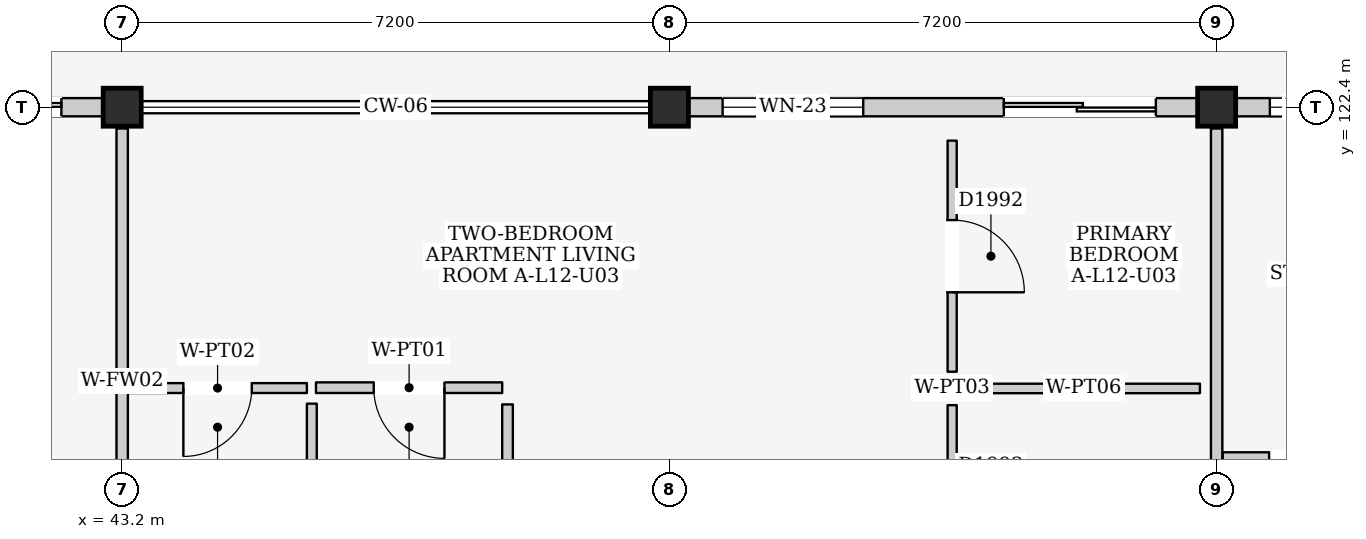
"""IFC4 building model, lengths in metres.
Left out: names, types, materials, properties, quantities, classifications, styles, units other than length and angle.
Written with IfcOpenShell. Run it as: python <this file> out.ifc"""

import sys

from ifc_helpers import new_model, si_unit, direction, frame, frame_2d, origin, origin_2d, place, context, subcontext, project, spatial, rectangle, extrude, element, fill, save


model = new_model("IFC4")
c1 = context("Model", 3, precision=1e-05, world=origin(), true_north=direction((0.0, 1.0)))
c2 = subcontext(c1, "Body", "Model", "MODEL_VIEW")
j1 = project(units=[si_unit("LENGTHUNIT", "METRE"), si_unit("PLANEANGLEUNIT", "RADIAN")], contexts=[c1])
p1 = place(None, origin())
s1 = spatial("IfcSite", under=j1, at=p1, CompositionType="ELEMENT")
p2 = place(p1, origin())
s2 = spatial("IfcBuilding", under=s1, at=p2, CompositionType="ELEMENT")
p3 = place(p2, frame((0.0, 0.0, 41.2)))
s3 = spatial("IfcBuildingStorey", under=s2, at=p3, CompositionType="ELEMENT", Elevation=41.2)
for number, where, z_axis, x_axis in (
    (1, (43.2, 122.4, 0.0), (0.0, 0.0, 1.0), (1.0, 0.0, 0.0)),
    (2, (50.4, 122.4, 0.0), (0.0, 0.0, 1.0), (1.0, 0.0, 0.0)),
    (3, (57.6, 122.4, 0.0), (0.0, 0.0, 1.0), (1.0, 0.0, 0.0)),
):
    element("IfcColumn", number, at=place(p3, frame(where, z_axis=z_axis, x_axis=x_axis)), inside=s3, PredefinedType="COLUMN", context=c2, shape_type="SweptSolid", body=[
        extrude(rectangle(XDim=0.5, YDim=0.5, at=origin_2d()), origin(), (0.0, 0.0, 1.0), 3.2),
    ])
p4 = place(p3, frame((36.25, 122.4, 0.0), z_axis=(0.0, 0.0, 1.0), x_axis=(1.0, 0.0, 0.0)))
e4 = element("IfcWall", 4, at=p4, inside=s3, PredefinedType="ELEMENTEDWALL", context=c2, shape_type="SweptSolid", body=[
    extrude(rectangle(XDim=6.7, YDim=0.24, at=frame_2d((3.35, 0.0))), origin(), (0.0, 0.0, 1.0), 2.485),
])
p5 = place(p4, frame((4.65, 0.0, 0.0)))
e5 = element("IfcOpeningElement", 5, at=p5, cuts=e4, PredefinedType="OPENING", context=c2, shape_type="SweptSolid", body=[
    extrude(rectangle(XDim=1.5, YDim=2.12, at=frame_2d((0.75, 1.06))), frame((0.0, 0.135, 0.0), z_axis=(0.0, -1.0, 0.0), x_axis=(1.0, 0.0, 0.0)), (0.0, 0.0, 1.0), 0.27),
])
p6 = place(p4, frame((0.45, 0.0, 0.775)))
e6 = element("IfcOpeningElement", 6, at=p6, cuts=e4, PredefinedType="OPENING", context=c2, shape_type="SweptSolid", body=[
    extrude(rectangle(XDim=2.3, YDim=1.6, at=frame_2d((1.15, 0.8))), frame((0.0, 0.135, 0.0), z_axis=(0.0, -1.0, 0.0), x_axis=(1.0, 0.0, 0.0)), (0.0, 0.0, 1.0), 0.27),
])
p7 = place(p3, frame((50.65, 122.4, 0.0), z_axis=(0.0, 0.0, 1.0), x_axis=(1.0, 0.0, 0.0)))
e7 = element("IfcWall", 7, at=p7, inside=s3, PredefinedType="ELEMENTEDWALL", context=c2, shape_type="SweptSolid", body=[
    extrude(rectangle(XDim=6.7, YDim=0.24, at=frame_2d((3.35, 0.0))), origin(), (0.0, 0.0, 1.0), 2.485),
])
p8 = place(p7, frame((4.15, 0.0, 0.0)))
e8 = element("IfcOpeningElement", 8, at=p8, cuts=e7, PredefinedType="OPENING", context=c2, shape_type="SweptSolid", body=[
    extrude(rectangle(XDim=2.0, YDim=2.12, at=frame_2d((1.0, 1.06))), frame((0.0, 0.135, 0.0), z_axis=(0.0, -1.0, 0.0), x_axis=(1.0, 0.0, 0.0)), (0.0, 0.0, 1.0), 0.27),
])
p9 = place(p7, frame((0.45, 0.0, 0.9)))
e9 = element("IfcOpeningElement", 9, at=p9, cuts=e7, PredefinedType="OPENING", context=c2, shape_type="SweptSolid", body=[
    extrude(rectangle(XDim=1.85, YDim=1.4, at=frame_2d((0.925, 0.7))), frame((0.0, 0.135, 0.0), z_axis=(0.0, -1.0, 0.0), x_axis=(1.0, 0.0, 0.0)), (0.0, 0.0, 1.0), 0.27),
])
p10 = place(p3, frame((57.85, 122.4, 0.0), z_axis=(0.0, 0.0, 1.0), x_axis=(1.0, 0.0, 0.0)))
e10 = element("IfcWall", 10, at=p10, inside=s3, PredefinedType="ELEMENTEDWALL", context=c2, shape_type="SweptSolid", body=[
    extrude(rectangle(XDim=6.7, YDim=0.24, at=frame_2d((3.35, 0.0))), origin(), (0.0, 0.0, 1.0), 2.485),
])
p11 = place(p10, frame((4.75, 0.0, 0.0)))
e11 = element("IfcOpeningElement", 11, at=p11, cuts=e10, PredefinedType="OPENING", context=c2, shape_type="SweptSolid", body=[
    extrude(rectangle(XDim=1.4, YDim=2.1, at=frame_2d((0.7, 1.05))), frame((0.0, 0.135, 0.0), z_axis=(0.0, -1.0, 0.0), x_axis=(1.0, 0.0, 0.0)), (0.0, 0.0, 1.0), 0.27),
])
p12 = place(p10, frame((0.45, 0.0, 0.9)))
e12 = element("IfcOpeningElement", 12, at=p12, cuts=e10, PredefinedType="OPENING", context=c2, shape_type="SweptSolid", body=[
    extrude(rectangle(XDim=1.3, YDim=1.25, at=frame_2d((0.65, 0.625))), frame((0.0, 0.135, 0.0), z_axis=(0.0, -1.0, 0.0), x_axis=(1.0, 0.0, 0.0)), (0.0, 0.0, 1.0), 0.27),
])
for number, where, z_axis, x_axis in (
    (13, (43.2, 115.48, 0.0), (0.0, 0.0, 1.0), (0.0, 1.0, 0.0)),
    (14, (57.6, 115.48, 0.0), (0.0, 0.0, 1.0), (0.0, 1.0, 0.0)),
):
    element("IfcWall", number, at=place(p3, frame(where, z_axis=z_axis, x_axis=x_axis)), inside=s3, PredefinedType="PARTITIONING", context=c2, shape_type="SweptSolid", body=[
        extrude(rectangle(XDim=6.64, YDim=0.15, at=frame_2d((3.32, 0.0))), origin(), (0.0, 0.0, 1.0), 2.435),
    ])
p13 = place(p3, frame((43.28, 118.705, 0.0), z_axis=(0.0, 0.0, 1.0), x_axis=(1.0, 0.0, 0.0)))
e15 = element("IfcWall", 15, at=p13, inside=s3, PredefinedType="PARTITIONING", context=c2, shape_type="SweptSolid", body=[
    extrude(rectangle(XDim=2.35, YDim=0.13, at=frame_2d((1.175, 0.0))), origin(), (0.0, 0.0, 1.0), 2.95),
])
p14 = place(p13, frame((0.725, 0.0, 0.0)))
e16 = element("IfcOpeningElement", 16, at=p14, cuts=e15, PredefinedType="OPENING", context=c2, shape_type="SweptSolid", body=[
    extrude(rectangle(XDim=0.9, YDim=2.1, at=frame_2d((0.45, 1.05))), frame((0.0, 0.08, 0.0), z_axis=(0.0, -1.0, 0.0), x_axis=(1.0, 0.0, 0.0)), (0.0, 0.0, 1.0), 0.16),
])
p15 = place(p3, frame((45.695, 115.46, 0.0), z_axis=(0.0, 0.0, 1.0), x_axis=(0.0, 1.0, 0.0)))
e17 = element("IfcWall", 17, at=p15, inside=s3, PredefinedType="PARTITIONING", context=c2, shape_type="SweptSolid", body=[
    extrude(rectangle(XDim=3.04, YDim=0.13, at=frame_2d((1.52, 0.0))), origin(), (0.0, 0.0, 1.0), 2.95),
])
p16 = place(p3, frame((45.75, 118.71, 0.0), z_axis=(0.0, 0.0, 1.0), x_axis=(1.0, 0.0, 0.0)))
e18 = element("IfcWall", 18, at=p16, inside=s3, PredefinedType="PARTITIONING", context=c2, shape_type="SweptSolid", body=[
    extrude(rectangle(XDim=2.45, YDim=0.14, at=frame_2d((1.225, 0.0))), origin(), (0.0, 0.0, 1.0), 2.95),
])
p17 = place(p16, frame((0.76, 0.0, 0.0)))
e19 = element("IfcOpeningElement", 19, at=p17, cuts=e18, PredefinedType="OPENING", context=c2, shape_type="SweptSolid", body=[
    extrude(rectangle(XDim=0.93, YDim=2.14, at=frame_2d((0.465, 1.07))), frame((0.0, 0.085, 0.0), z_axis=(0.0, -1.0, 0.0), x_axis=(1.0, 0.0, 0.0)), (0.0, 0.0, 1.0), 0.17),
])
p18 = place(p3, frame((48.27, 115.43, 0.0), z_axis=(0.0, 0.0, 1.0), x_axis=(0.0, 1.0, 0.0)))
e20 = element("IfcWall", 20, at=p18, inside=s3, PredefinedType="PARTITIONING", context=c2, shape_type="SweptSolid", body=[
    extrude(rectangle(XDim=3.06, YDim=0.14, at=frame_2d((1.53, 0.0))), origin(), (0.0, 0.0, 1.0), 2.95),
])
p19 = place(p3, frame((54.12, 118.92, 0.0), z_axis=(0.0, 0.0, 1.0), x_axis=(0.0, 1.0, 0.0)))
e21 = element("IfcWall", 21, at=p19, inside=s3, PredefinedType="PARTITIONING", context=c2, shape_type="SweptSolid", body=[
    extrude(rectangle(XDim=3.04, YDim=0.12, at=frame_2d((1.52, 0.0))), origin(), (0.0, 0.0, 1.0), 2.95),
])
p20 = place(p19, frame((1.045, 0.0, 0.0)))
e22 = element("IfcOpeningElement", 22, at=p20, cuts=e21, PredefinedType="OPENING", context=c2, shape_type="SweptSolid", body=[
    extrude(rectangle(XDim=0.95, YDim=2.15, at=frame_2d((0.475, 1.075))), frame((0.0, 0.075, 0.0), z_axis=(0.0, -1.0, 0.0), x_axis=(1.0, 0.0, 0.0)), (0.0, 0.0, 1.0), 0.15),
])
p21 = place(p3, frame((54.32, 118.7, 0.0), z_axis=(0.0, 0.0, 1.0), x_axis=(1.0, 0.0, 0.0)))
e23 = element("IfcWall", 23, at=p21, inside=s3, PredefinedType="PARTITIONING", context=c2, shape_type="SweptSolid", body=[
    extrude(rectangle(XDim=3.06, YDim=0.125, at=frame_2d((1.53, 0.0))), origin(), (0.0, 0.0, 1.0), 2.95),
])
p22 = place(p3, frame((54.12, 115.44, 0.0), z_axis=(0.0, 0.0, 1.0), x_axis=(0.0, 1.0, 0.0)))
e24 = element("IfcWall", 24, at=p22, inside=s3, PredefinedType="PARTITIONING", context=c2, shape_type="SweptSolid", body=[
    extrude(rectangle(XDim=3.04, YDim=0.12, at=frame_2d((1.52, 0.0))), origin(), (0.0, 0.0, 1.0), 2.95),
])
p23 = place(p22, frame((1.04, 0.0, 0.0)))
e25 = element("IfcOpeningElement", 25, at=p23, cuts=e24, PredefinedType="OPENING", context=c2, shape_type="SweptSolid", body=[
    extrude(rectangle(XDim=0.96, YDim=2.15, at=frame_2d((0.48, 1.075))), frame((0.0, 0.075, 0.0), z_axis=(0.0, -1.0, 0.0), x_axis=(1.0, 0.0, 0.0)), (0.0, 0.0, 1.0), 0.15),
])
p24 = place(p3, frame((57.68, 117.795, 0.0), z_axis=(0.0, 0.0, 1.0), x_axis=(1.0, 0.0, 0.0)))
e26 = element("IfcWall", 26, at=p24, inside=s3, PredefinedType="PARTITIONING", context=c2, shape_type="SweptSolid", body=[
    extrude(rectangle(XDim=2.1, YDim=0.13, at=frame_2d((1.05, 0.0))), origin(), (0.0, 0.0, 1.0), 2.95),
])
p25 = place(p24, frame((0.61, 0.0, 0.0)))
e27 = element("IfcOpeningElement", 27, at=p25, cuts=e26, PredefinedType="OPENING", context=c2, shape_type="SweptSolid", body=[
    extrude(rectangle(XDim=0.88, YDim=2.1, at=frame_2d((0.44, 1.05))), frame((0.0, 0.08, 0.0), z_axis=(0.0, -1.0, 0.0), x_axis=(1.0, 0.0, 0.0)), (0.0, 0.0, 1.0), 0.16),
])
p26 = place(p5, frame((1.5, 0.0, 0.0), z_axis=(0.0, 0.0, 1.0), x_axis=(-1.0, 0.0, 0.0)))
e28 = element("IfcDoor", 28, at=p26, inside=s3, OperationType="SLIDING_TO_LEFT", PredefinedType="DOOR", context=c2, shape_type="SweptSolid", body=[
    extrude(rectangle(XDim=1.5, YDim=2.12, at=frame_2d((0.75, 1.06))), frame((0.0, 0.025, 0.0), z_axis=(0.0, -1.0, 0.0), x_axis=(1.0, 0.0, 0.0)), (0.0, 0.0, 1.0), 0.05),
])
fill(e5, e28)
p27 = place(p8, frame((2.0, 0.0, 0.0), z_axis=(0.0, 0.0, 1.0), x_axis=(-1.0, 0.0, 0.0)))
e29 = element("IfcDoor", 29, at=p27, inside=s3, OperationType="DOUBLE_DOOR_SLIDING", PredefinedType="DOOR", context=c2, shape_type="SweptSolid", body=[
    extrude(rectangle(XDim=2.0, YDim=2.12, at=frame_2d((1.0, 1.06))), frame((0.0, 0.025, 0.0), z_axis=(0.0, -1.0, 0.0), x_axis=(1.0, 0.0, 0.0)), (0.0, 0.0, 1.0), 0.05),
])
fill(e8, e29)
p28 = place(p9, origin())
e30 = element("IfcWindow", 30, at=p28, inside=s3, PartitioningType="DOUBLE_PANEL_VERTICAL", PredefinedType="WINDOW", context=c2, shape_type="SweptSolid", body=[
    extrude(rectangle(XDim=1.85, YDim=1.4, at=frame_2d((0.925, 0.7))), frame((0.0, 0.03, 0.0), z_axis=(0.0, -1.0, 0.0), x_axis=(1.0, 0.0, 0.0)), (0.0, 0.0, 1.0), 0.06),
])
fill(e9, e30)
p29 = place(p12, origin())
e31 = element("IfcWindow", 31, at=p29, inside=s3, PartitioningType="SINGLE_PANEL", PredefinedType="WINDOW", context=c2, shape_type="SweptSolid", body=[
    extrude(rectangle(XDim=1.3, YDim=1.25, at=frame_2d((0.65, 0.625))), frame((0.0, 0.03, 0.0), z_axis=(0.0, -1.0, 0.0), x_axis=(1.0, 0.0, 0.0)), (0.0, 0.0, 1.0), 0.06),
])
fill(e12, e31)
p30 = place(p14, frame((0.9, 0.0, 0.0), z_axis=(0.0, 0.0, 1.0), x_axis=(-1.0, 0.0, 0.0)))
e32 = element("IfcDoor", 32, at=p30, inside=s3, OperationType="SINGLE_SWING_RIGHT", PredefinedType="DOOR", context=c2, shape_type="SweptSolid", body=[
    extrude(rectangle(XDim=0.9, YDim=2.1, at=frame_2d((0.45, 1.05))), frame((0.0, 0.025, 0.0), z_axis=(0.0, -1.0, 0.0), x_axis=(1.0, 0.0, 0.0)), (0.0, 0.0, 1.0), 0.05),
])
fill(e16, e32)
p31 = place(p17, frame((0.93, 0.0, 0.0), z_axis=(0.0, 0.0, 1.0), x_axis=(-1.0, 0.0, 0.0)))
e33 = element("IfcDoor", 33, at=p31, inside=s3, OperationType="SINGLE_SWING_LEFT", PredefinedType="DOOR", context=c2, shape_type="SweptSolid", body=[
    extrude(rectangle(XDim=0.93, YDim=2.14, at=frame_2d((0.465, 1.07))), frame((0.0, 0.025, 0.0), z_axis=(0.0, -1.0, 0.0), x_axis=(1.0, 0.0, 0.0)), (0.0, 0.0, 1.0), 0.05),
])
fill(e19, e33)
p32 = place(p20, frame((0.95, 0.0, 0.0), z_axis=(0.0, 0.0, 1.0), x_axis=(-1.0, 0.0, 0.0)))
e34 = element("IfcDoor", 34, at=p32, inside=s3, OperationType="SINGLE_SWING_RIGHT", PredefinedType="DOOR", context=c2, shape_type="SweptSolid", body=[
    extrude(rectangle(XDim=0.95, YDim=2.15, at=frame_2d((0.475, 1.075))), frame((0.0, 0.025, 0.0), z_axis=(0.0, -1.0, 0.0), x_axis=(1.0, 0.0, 0.0)), (0.0, 0.0, 1.0), 0.05),
])
fill(e22, e34)
p33 = place(p25, frame((0.88, 0.0, 0.0), z_axis=(0.0, 0.0, 1.0), x_axis=(-1.0, 0.0, 0.0)))
e35 = element("IfcDoor", 35, at=p33, inside=s3, OperationType="SINGLE_SWING_LEFT", PredefinedType="DOOR", context=c2, shape_type="SweptSolid", body=[
    extrude(rectangle(XDim=0.88, YDim=2.1, at=frame_2d((0.44, 1.05))), frame((0.0, 0.025, 0.0), z_axis=(0.0, -1.0, 0.0), x_axis=(1.0, 0.0, 0.0)), (0.0, 0.0, 1.0), 0.05),
])
fill(e27, e35)
save(model, sys.argv[1])
